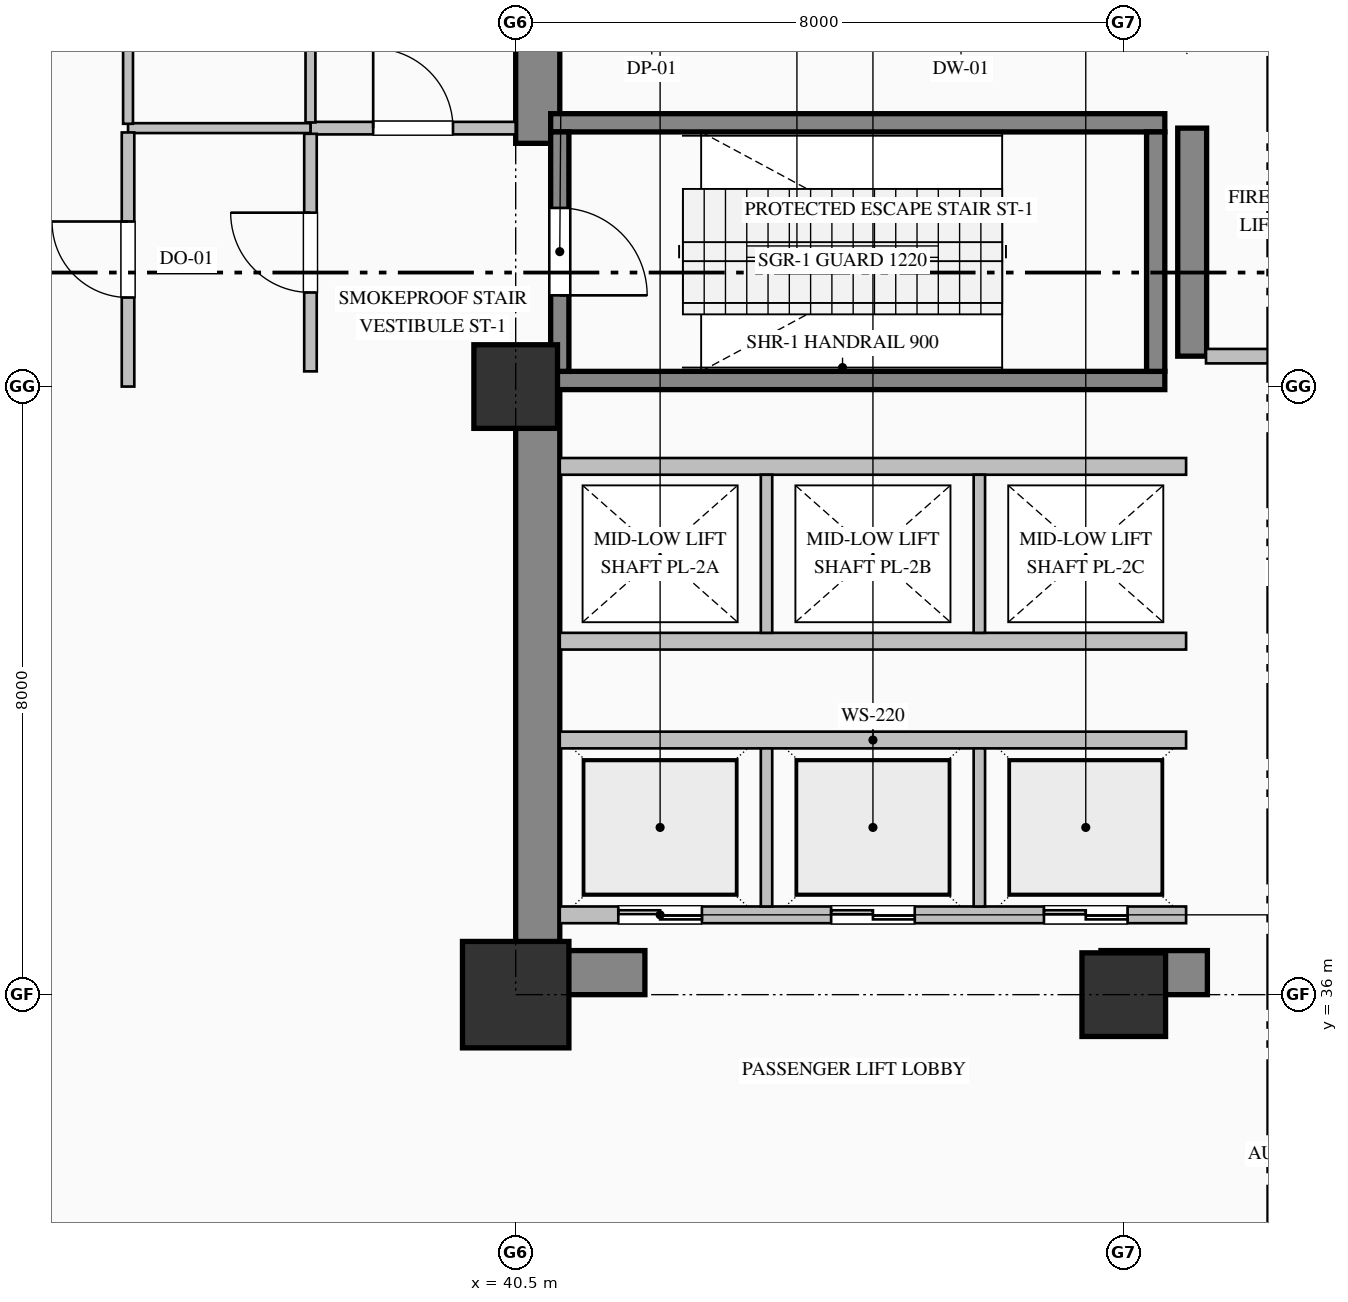
"""IFC4 building model, lengths in metres.
Left out: names, types, materials, properties, quantities, classifications, styles, units other than length and angle.
Written with IfcOpenShell. Run it as: python <this file> out.ifc"""

import sys

from ifc_helpers import new_model, si_unit, direction, frame, frame_2d, origin, origin_2d, place, context, subcontext, project, spatial, rectangle, hollow_rectangle, extrude, element, fill, save


model = new_model("IFC4")
c1 = context("Model", 3, precision=1e-05, world=origin(), true_north=direction((0.0, 1.0)))
c2 = subcontext(c1, "Body", "Model", "MODEL_VIEW")
j1 = project(units=[si_unit("LENGTHUNIT", "METRE"), si_unit("PLANEANGLEUNIT", "RADIAN")], contexts=[c1])
p1 = place(None, origin())
s1 = spatial("IfcSite", under=j1, at=p1, CompositionType="ELEMENT")
p2 = place(p1, origin())
s2 = spatial("IfcBuilding", under=s1, at=p2, CompositionType="ELEMENT")
p3 = place(p2, frame((0.0, 0.0, 11.4)))
s3 = spatial("IfcBuildingStorey", under=s2, at=p3, CompositionType="ELEMENT", Elevation=11.4)
p4 = place(p3, frame((40.79, 36.58, 0.0), z_axis=(0.0, 0.0, 1.0), x_axis=(0.0, 1.0, 0.0)))
e1 = element("IfcWall", 1, at=p4, inside=s3, PredefinedType="SHEAR", context=c2, shape_type="SweptSolid", body=[
    extrude(rectangle(XDim=7.82, YDim=0.58, at=frame_2d((3.91, 0.0))), origin(), (0.0, 0.0, 1.0), 5.55),
])
p5 = place(p3, frame((40.79, 47.2, 0.0), z_axis=(0.0, 0.0, 1.0), x_axis=(0.0, 1.0, 0.0)))
e2 = element("IfcWall", 2, at=p5, inside=s3, PredefinedType="SHEAR", context=c2, shape_type="SweptSolid", body=[
    extrude(rectangle(XDim=4.22, YDim=0.58, at=frame_2d((2.11, 0.0))), origin(), (0.0, 0.0, 1.0), 5.55),
])
p6 = place(p3, frame((40.5, 36.29, 0.0), z_axis=(0.0, 0.0, 1.0), x_axis=(1.0, 0.0, 0.0)))
e3 = element("IfcWall", 3, at=p6, inside=s3, PredefinedType="SHEAR", context=c2, shape_type="SweptSolid", body=[
    extrude(rectangle(XDim=1.7, YDim=0.58, at=frame_2d((0.85, 0.0))), origin(), (0.0, 0.0, 1.0), 5.55),
])
p7 = place(p3, frame((48.2, 36.29, 0.0), z_axis=(0.0, 0.0, 1.0), x_axis=(1.0, 0.0, 0.0)))
e4 = element("IfcWall", 4, at=p7, inside=s3, PredefinedType="SHEAR", context=c2, shape_type="SweptSolid", body=[
    extrude(rectangle(XDim=1.4, YDim=0.58, at=frame_2d((0.7, 0.0))), origin(), (0.0, 0.0, 1.0), 5.55),
])
p8 = place(p3, frame((49.4, 44.4, 0.0), z_axis=(0.0, 0.0, 1.0), x_axis=(0.0, 1.0, 0.0)))
e5 = element("IfcWall", 5, at=p8, inside=s3, PredefinedType="SHEAR", context=c2, shape_type="SweptSolid", body=[
    extrude(rectangle(XDim=3.0, YDim=0.38, at=frame_2d((1.5, 0.0))), origin(), (0.0, 0.0, 1.0), 5.55),
])
p9 = place(p3, frame((40.5, 36.0, 0.0), z_axis=(0.0, 0.0, 1.0), x_axis=(1.0, 0.0, 0.0)))
e6 = element("IfcColumn", 6, at=p9, inside=s3, PredefinedType="COLUMN", context=c2, shape_type="SweptSolid", body=[
    extrude(hollow_rectangle(XDim=1.4, YDim=1.4, WallThickness=0.05, at=origin_2d()), origin(), (0.0, 0.0, 1.0), 6.0),
])
for number, where, z_axis, x_axis in (
    (7, (40.5, 44.0, 0.0), (0.0, 0.0, 1.0), (1.0, 0.0, 0.0)),
    (8, (48.5, 36.0, 0.0), (0.0, 0.0, 1.0), (1.0, 0.0, 0.0)),
):
    element("IfcColumn", number, at=place(p3, frame(where, z_axis=z_axis, x_axis=x_axis)), inside=s3, PredefinedType="COLUMN", context=c2, shape_type="SweptSolid", body=[
        extrude(rectangle(XDim=1.1, YDim=1.1, at=origin_2d()), origin(), (0.0, 0.0, 1.0), 6.0),
    ])
for number, where, z_axis, x_axis in (
    (9, (40.96, 47.47, 0.0), (0.0, 0.0, 1.0), (1.0, 0.0, 0.0)),
    (10, (49.04, 44.08, 0.0), (0.0, 0.0, 1.0), (-1.0, 0.0, 0.0)),
):
    element("IfcWall", number, at=place(p3, frame(where, z_axis=z_axis, x_axis=x_axis)), inside=s3, PredefinedType="SOLIDWALL", context=c2, shape_type="SweptSolid", body=[
        extrude(rectangle(XDim=8.08, YDim=0.24, at=frame_2d((4.04, 0.0))), origin(), (0.0, 0.0, 1.0), 6.0),
    ])
p10 = place(p3, frame((41.08, 47.35, 0.0), z_axis=(0.0, 0.0, 1.0), x_axis=(0.0, -1.0, 0.0)))
e11 = element("IfcWall", 11, at=p10, inside=s3, PredefinedType="SOLIDWALL", context=c2, shape_type="SweptSolid", body=[
    extrude(rectangle(XDim=3.15, YDim=0.24, at=frame_2d((1.575, 0.0))), origin(), (0.0, 0.0, 1.0), 6.0),
])
p11 = place(p10, frame((1.0, 0.0, 0.0)))
e12 = element("IfcOpeningElement", 12, at=p11, cuts=e11, PredefinedType="OPENING", context=c2, shape_type="SweptSolid", body=[
    extrude(rectangle(XDim=1.15, YDim=2.2, at=frame_2d((0.575, 1.1))), frame((0.0, 0.13, 0.0), z_axis=(0.0, -1.0, 0.0), x_axis=(1.0, 0.0, 0.0)), (0.0, 0.0, 1.0), 0.26),
])
p12 = place(p3, frame((48.92, 44.2, 0.0), z_axis=(0.0, 0.0, 1.0), x_axis=(0.0, 1.0, 0.0)))
e13 = element("IfcWall", 13, at=p12, inside=s3, PredefinedType="SOLIDWALL", context=c2, shape_type="SweptSolid", body=[
    extrude(rectangle(XDim=3.15, YDim=0.24, at=frame_2d((1.575, 0.0))), origin(), (0.0, 0.0, 1.0), 6.0),
])
p13 = place(p3, frame((49.32, 37.05, 0.0), z_axis=(0.0, 0.0, 1.0), x_axis=(-1.0, 0.0, 0.0)))
e14 = element("IfcWall", 14, at=p13, inside=s3, PredefinedType="PARTITIONING", context=c2, shape_type="SweptSolid", body=[
    extrude(rectangle(XDim=8.24, YDim=0.22, at=frame_2d((4.12, 0.0))), origin(), (0.0, 0.0, 1.0), 5.55),
])
p14 = place(p13, frame((6.37, 0.0, 0.0)))
e15 = element("IfcOpeningElement", 15, at=p14, cuts=e14, PredefinedType="OPENING", context=c2, shape_type="SweptSolid", body=[
    extrude(rectangle(XDim=1.1, YDim=2.2, at=frame_2d((0.55, 1.1))), frame((0.0, 0.12, 0.0), z_axis=(0.0, -1.0, 0.0), x_axis=(1.0, 0.0, 0.0)), (0.0, 0.0, 1.0), 0.24),
])
p15 = place(p13, frame((3.57, 0.0, 0.0)))
e16 = element("IfcOpeningElement", 16, at=p15, cuts=e14, PredefinedType="OPENING", context=c2, shape_type="SweptSolid", body=[
    extrude(rectangle(XDim=1.1, YDim=2.2, at=frame_2d((0.55, 1.1))), frame((0.0, 0.12, 0.0), z_axis=(0.0, -1.0, 0.0), x_axis=(1.0, 0.0, 0.0)), (0.0, 0.0, 1.0), 0.24),
])
p16 = place(p13, frame((0.77, 0.0, 0.0)))
e17 = element("IfcOpeningElement", 17, at=p16, cuts=e14, PredefinedType="OPENING", context=c2, shape_type="SweptSolid", body=[
    extrude(rectangle(XDim=1.1, YDim=2.2, at=frame_2d((0.55, 1.1))), frame((0.0, 0.12, 0.0), z_axis=(0.0, -1.0, 0.0), x_axis=(1.0, 0.0, 0.0)), (0.0, 0.0, 1.0), 0.24),
])
p17 = place(p3, frame((41.08, 39.35, 0.0), z_axis=(0.0, 0.0, 1.0), x_axis=(1.0, 0.0, 0.0)))
e18 = element("IfcWall", 18, at=p17, inside=s3, PredefinedType="PARTITIONING", context=c2, shape_type="SweptSolid", body=[
    extrude(rectangle(XDim=8.24, YDim=0.22, at=frame_2d((4.12, 0.0))), origin(), (0.0, 0.0, 1.0), 5.55),
])
for number, where, z_axis, x_axis in (
    (19, (43.8, 37.16, 0.0), (0.0, 0.0, 1.0), (0.0, 1.0, 0.0)),
    (20, (46.6, 37.16, 0.0), (0.0, 0.0, 1.0), (0.0, 1.0, 0.0)),
):
    element("IfcWall", number, at=place(p3, frame(where, z_axis=z_axis, x_axis=x_axis)), inside=s3, PredefinedType="PARTITIONING", context=c2, shape_type="SweptSolid", body=[
        extrude(rectangle(XDim=2.08, YDim=0.15, at=frame_2d((1.04, 0.0))), origin(), (0.0, 0.0, 1.0), 5.55),
    ])
for number, where, z_axis, x_axis in (
    (21, (49.32, 40.65, 0.0), (0.0, 0.0, 1.0), (-1.0, 0.0, 0.0)),
    (22, (41.08, 42.95, 0.0), (0.0, 0.0, 1.0), (1.0, 0.0, 0.0)),
):
    element("IfcWall", number, at=place(p3, frame(where, z_axis=z_axis, x_axis=x_axis)), inside=s3, PredefinedType="PARTITIONING", context=c2, shape_type="SweptSolid", body=[
        extrude(rectangle(XDim=8.24, YDim=0.22, at=frame_2d((4.12, 0.0))), origin(), (0.0, 0.0, 1.0), 5.55),
    ])
for number, where, z_axis, x_axis in (
    (23, (43.8, 40.76, 0.0), (0.0, 0.0, 1.0), (0.0, 1.0, 0.0)),
    (24, (46.6, 40.76, 0.0), (0.0, 0.0, 1.0), (0.0, 1.0, 0.0)),
):
    element("IfcWall", number, at=place(p3, frame(where, z_axis=z_axis, x_axis=x_axis)), inside=s3, PredefinedType="PARTITIONING", context=c2, shape_type="SweptSolid", body=[
        extrude(rectangle(XDim=2.08, YDim=0.15, at=frame_2d((1.04, 0.0))), origin(), (0.0, 0.0, 1.0), 5.55),
    ])
p18 = place(p3, frame((37.8, 47.4, 0.0), z_axis=(0.0, 0.0, 1.0), x_axis=(1.0, 0.0, 0.0)))
e25 = element("IfcWall", 25, at=p18, inside=s3, PredefinedType="PARTITIONING", context=c2, shape_type="SweptSolid", body=[
    extrude(rectangle(XDim=2.7, YDim=0.165, at=frame_2d((1.35, 0.0))), origin(), (0.0, 0.0, 1.0), 5.55),
])
p19 = place(p18, frame((0.825, 0.0, 0.0)))
e26 = element("IfcOpeningElement", 26, at=p19, cuts=e25, PredefinedType="OPENING", context=c2, shape_type="SweptSolid", body=[
    extrude(rectangle(XDim=1.05, YDim=2.15, at=frame_2d((0.525, 1.075))), frame((0.0, 0.093, 0.0), z_axis=(0.0, -1.0, 0.0), x_axis=(1.0, 0.0, 0.0)), (0.0, 0.0, 1.0), 0.185),
])
p20 = place(p3, frame((37.8, 44.2, 0.0), z_axis=(0.0, 0.0, 1.0), x_axis=(0.0, 1.0, 0.0)))
e27 = element("IfcWall", 27, at=p20, inside=s3, PredefinedType="PARTITIONING", context=c2, shape_type="SweptSolid", body=[
    extrude(rectangle(XDim=3.125, YDim=0.165, at=frame_2d((1.563, 0.0))), origin(), (0.0, 0.0, 1.0), 5.55),
])
p21 = place(p20, frame((1.038, 0.0, 0.0)))
e28 = element("IfcOpeningElement", 28, at=p21, cuts=e27, PredefinedType="OPENING", context=c2, shape_type="SweptSolid", body=[
    extrude(rectangle(XDim=1.05, YDim=2.15, at=frame_2d((0.525, 1.075))), frame((0.0, 0.093, 0.0), z_axis=(0.0, -1.0, 0.0), x_axis=(1.0, 0.0, 0.0)), (0.0, 0.0, 1.0), 0.185),
])
p22 = place(p3, frame((37.8, 47.475, 0.0), z_axis=(0.0, 0.0, 1.0), x_axis=(0.0, 1.0, 0.0)))
e29 = element("IfcWall", 29, at=p22, inside=s3, PredefinedType="PARTITIONING", context=c2, shape_type="SweptSolid", body=[
    extrude(rectangle(XDim=4.153, YDim=0.13, at=frame_2d((2.077, 0.0))), origin(), (0.0, 0.0, 1.0), 5.55),
])
p23 = place(p22, frame((1.567, 0.0, 0.0)))
e30 = element("IfcOpeningElement", 30, at=p23, cuts=e29, PredefinedType="OPENING", context=c2, shape_type="SweptSolid", body=[
    extrude(rectangle(XDim=1.02, YDim=2.15, at=frame_2d((0.51, 1.075))), frame((0.0, 0.075, 0.0), z_axis=(0.0, -1.0, 0.0), x_axis=(1.0, 0.0, 0.0)), (0.0, 0.0, 1.0), 0.15),
])
p24 = place(p3, frame((37.8, 47.4, 0.0), z_axis=(0.0, 0.0, 1.0), x_axis=(-1.0, 0.0, 0.0)))
e31 = element("IfcWall", 31, at=p24, inside=s3, PredefinedType="PARTITIONING", context=c2, shape_type="SweptSolid", body=[
    extrude(rectangle(XDim=2.4, YDim=0.13, at=frame_2d((1.2, 0.0))), origin(), (0.0, 0.0, 1.0), 5.55),
])
p25 = place(p3, frame((35.4, 47.457, 0.0), z_axis=(0.0, 0.0, 1.0), x_axis=(0.0, 1.0, 0.0)))
e32 = element("IfcWall", 32, at=p25, inside=s3, PredefinedType="PARTITIONING", context=c2, shape_type="SweptSolid", body=[
    extrude(rectangle(XDim=4.171, YDim=0.13, at=frame_2d((2.085, 0.0))), origin(), (0.0, 0.0, 1.0), 5.55),
])
p26 = place(p3, frame((54.718, 44.4, 0.0), z_axis=(0.0, 0.0, 1.0), x_axis=(-1.0, 0.0, 0.0)))
e33 = element("IfcWall", 33, at=p26, inside=s3, PredefinedType="PARTITIONING", context=c2, shape_type="SweptSolid", body=[
    extrude(rectangle(XDim=5.136, YDim=0.19, at=frame_2d((2.568, 0.0))), origin(), (0.0, 0.0, 1.0), 5.55),
])
p27 = place(p26, frame((2.043, 0.0, 0.0)))
e34 = element("IfcOpeningElement", 34, at=p27, cuts=e33, PredefinedType="OPENING", context=c2, shape_type="SweptSolid", body=[
    extrude(rectangle(XDim=1.05, YDim=2.15, at=frame_2d((0.525, 1.075))), frame((0.0, 0.105, 0.0), z_axis=(0.0, -1.0, 0.0), x_axis=(1.0, 0.0, 0.0)), (0.0, 0.0, 1.0), 0.21),
])
p28 = place(p3, frame((35.4, 44.0, 0.0), z_axis=(0.0, 0.0, 1.0), x_axis=(0.0, 1.0, 0.0)))
e35 = element("IfcWall", 35, at=p28, inside=s3, PredefinedType="PARTITIONING", context=c2, shape_type="SweptSolid", body=[
    extrude(rectangle(XDim=3.343, YDim=0.165, at=frame_2d((1.671, 0.0))), origin(), (0.0, 0.0, 1.0), 5.55),
])
p29 = place(p28, frame((1.171, 0.0, 0.0)))
e36 = element("IfcOpeningElement", 36, at=p29, cuts=e35, PredefinedType="OPENING", context=c2, shape_type="SweptSolid", body=[
    extrude(rectangle(XDim=1.0, YDim=2.15, at=frame_2d((0.5, 1.075))), frame((0.0, 0.093, 0.0), z_axis=(0.0, -1.0, 0.0), x_axis=(1.0, 0.0, 0.0)), (0.0, 0.0, 1.0), 0.185),
])
p30 = place(p11, origin())
e37 = element("IfcDoor", 37, at=p30, inside=s3, OperationType="SINGLE_SWING_RIGHT", PredefinedType="DOOR", context=c2, shape_type="SweptSolid", body=[
    extrude(rectangle(XDim=1.15, YDim=2.2, at=frame_2d((0.575, 1.1))), frame((0.0, 0.025, 0.0), z_axis=(0.0, -1.0, 0.0), x_axis=(1.0, 0.0, 0.0)), (0.0, 0.0, 1.0), 0.05),
])
fill(e12, e37)
p31 = place(p14, origin())
e38 = element("IfcDoor", 38, at=p31, inside=s3, OperationType="DOUBLE_DOOR_SLIDING", PredefinedType="DOOR", context=c2, shape_type="SweptSolid", body=[
    extrude(rectangle(XDim=1.1, YDim=2.2, at=frame_2d((0.55, 1.1))), frame((0.0, 0.025, 0.0), z_axis=(0.0, -1.0, 0.0), x_axis=(1.0, 0.0, 0.0)), (0.0, 0.0, 1.0), 0.05),
])
fill(e15, e38)
p32 = place(p15, origin())
e39 = element("IfcDoor", 39, at=p32, inside=s3, OperationType="DOUBLE_DOOR_SLIDING", PredefinedType="DOOR", context=c2, shape_type="SweptSolid", body=[
    extrude(rectangle(XDim=1.1, YDim=2.2, at=frame_2d((0.55, 1.1))), frame((0.0, 0.025, 0.0), z_axis=(0.0, -1.0, 0.0), x_axis=(1.0, 0.0, 0.0)), (0.0, 0.0, 1.0), 0.05),
])
fill(e16, e39)
p33 = place(p16, origin())
e40 = element("IfcDoor", 40, at=p33, inside=s3, OperationType="DOUBLE_DOOR_SLIDING", PredefinedType="DOOR", context=c2, shape_type="SweptSolid", body=[
    extrude(rectangle(XDim=1.1, YDim=2.2, at=frame_2d((0.55, 1.1))), frame((0.0, 0.025, 0.0), z_axis=(0.0, -1.0, 0.0), x_axis=(1.0, 0.0, 0.0)), (0.0, 0.0, 1.0), 0.05),
])
fill(e17, e40)
p34 = place(p21, origin())
e41 = element("IfcDoor", 41, at=p34, inside=s3, OperationType="SINGLE_SWING_RIGHT", PredefinedType="DOOR", context=c2, shape_type="SweptSolid", body=[
    extrude(rectangle(XDim=1.05, YDim=2.15, at=frame_2d((0.525, 1.075))), frame((0.0, 0.025, 0.0), z_axis=(0.0, -1.0, 0.0), x_axis=(1.0, 0.0, 0.0)), (0.0, 0.0, 1.0), 0.05),
])
fill(e28, e41)
p35 = place(p19, origin())
e42 = element("IfcDoor", 42, at=p35, inside=s3, OperationType="SINGLE_SWING_LEFT", PredefinedType="DOOR", context=c2, shape_type="SweptSolid", body=[
    extrude(rectangle(XDim=1.05, YDim=2.15, at=frame_2d((0.525, 1.075))), frame((0.0, 0.025, 0.0), z_axis=(0.0, -1.0, 0.0), x_axis=(1.0, 0.0, 0.0)), (0.0, 0.0, 1.0), 0.05),
])
fill(e26, e42)
p36 = place(p29, origin())
e43 = element("IfcDoor", 43, at=p36, inside=s3, OperationType="SINGLE_SWING_RIGHT", PredefinedType="DOOR", context=c2, shape_type="SweptSolid", body=[
    extrude(rectangle(XDim=1.0, YDim=2.15, at=frame_2d((0.5, 1.075))), frame((0.0, 0.025, 0.0), z_axis=(0.0, -1.0, 0.0), x_axis=(1.0, 0.0, 0.0)), (0.0, 0.0, 1.0), 0.05),
])
fill(e36, e43)
save(model, sys.argv[1])
